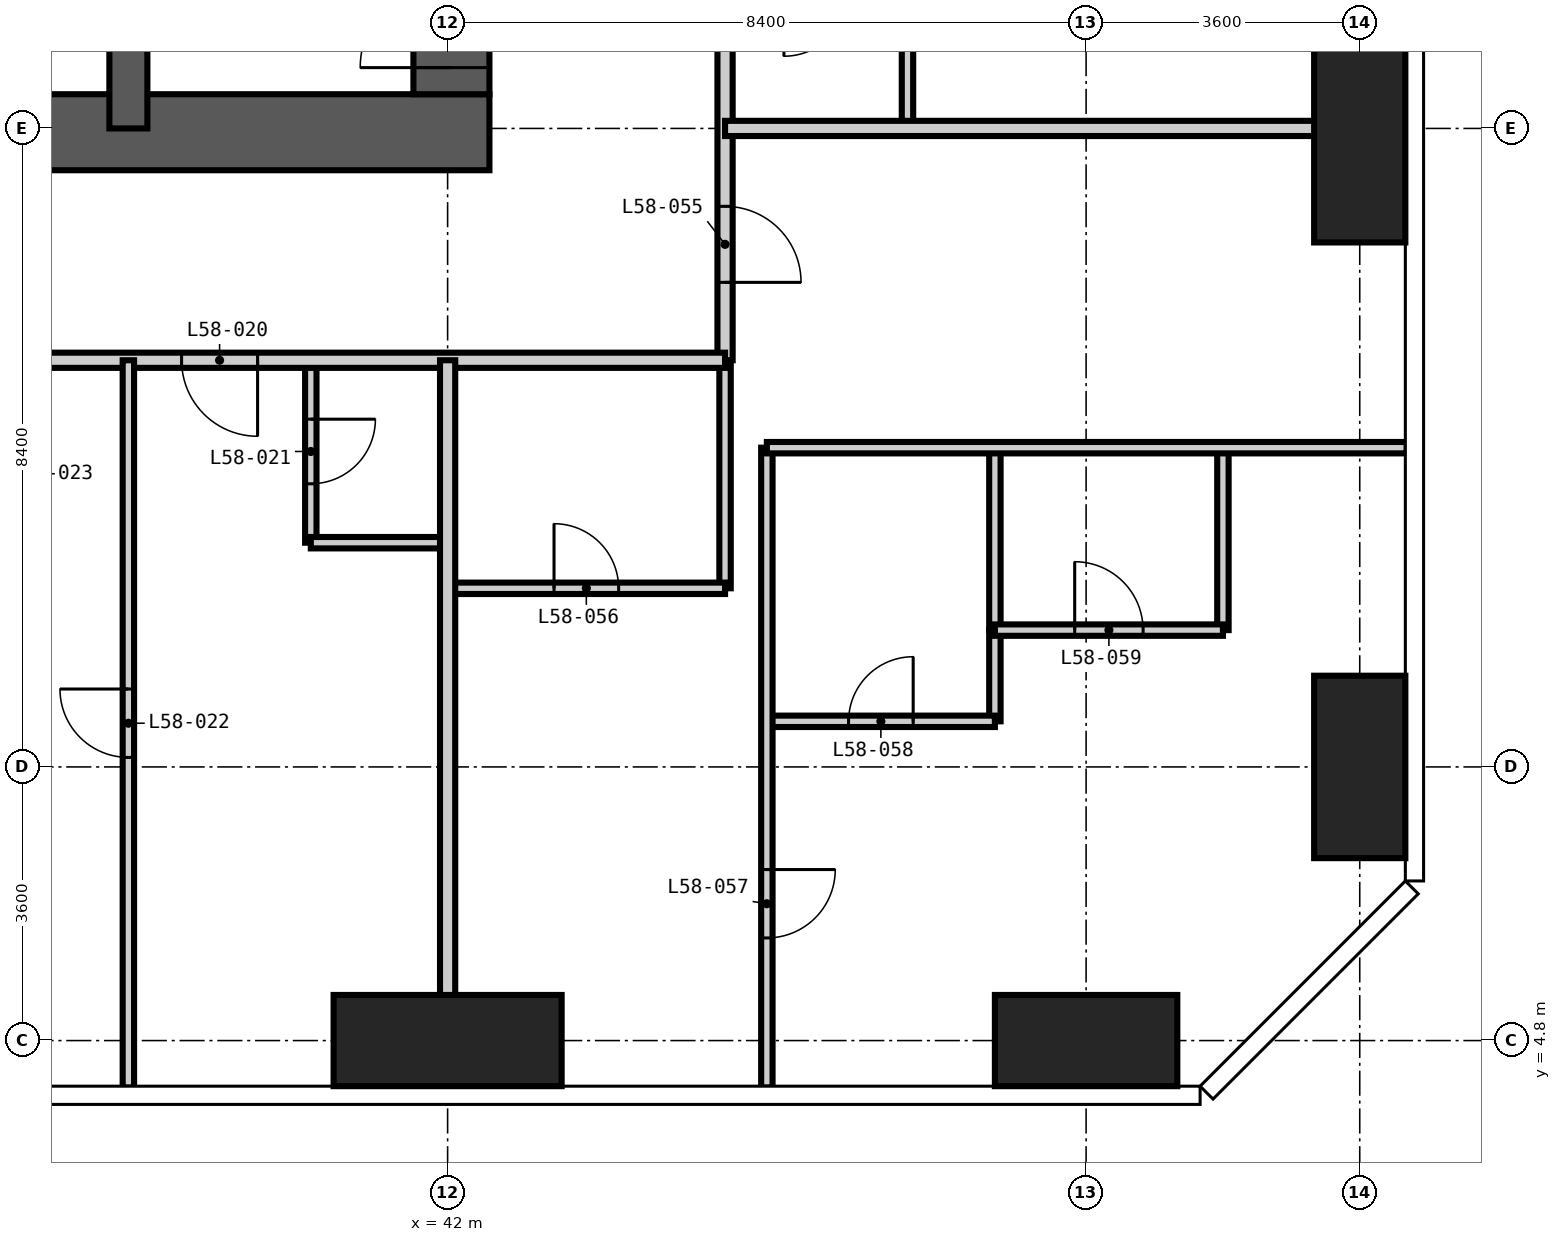
"""IFC4 building model, lengths in metres.
Left out: names, types, materials, properties, quantities, classifications, styles, units other than length and angle.
Written with IfcOpenShell. Run it as: python <this file> out.ifc"""

import sys

from ifc_helpers import new_model, si_unit, direction, frame, frame_2d, origin, origin_2d, place, context, subcontext, project, spatial, rectangle, extrude, element, fill, save


model = new_model("IFC4")
c1 = context("Model", 3, precision=1e-05, world=origin(), true_north=direction((0.0, 1.0)))
c2 = subcontext(c1, "Body", "Model", "MODEL_VIEW")
j1 = project(units=[si_unit("LENGTHUNIT", "METRE"), si_unit("PLANEANGLEUNIT", "RADIAN")], contexts=[c1])
p1 = place(None, origin())
s1 = spatial("IfcSite", under=j1, at=p1, CompositionType="ELEMENT")
p2 = place(p1, origin())
s2 = spatial("IfcBuilding", under=s1, at=p2, CompositionType="ELEMENT")
p3 = place(p2, frame((0.0, 0.0, 225.6)))
s3 = spatial("IfcBuildingStorey", under=s2, at=p3, CompositionType="ELEMENT", Elevation=225.6)
p4 = place(p3, frame((42.0, 4.8, -0.35), z_axis=(0.0, 0.0, 1.0), x_axis=(1.0, 0.0, 0.0)))
e1 = element("IfcColumn", 1, at=p4, inside=s3, PredefinedType="COLUMN", context=c2, shape_type="SweptSolid", body=[
    extrude(rectangle(XDim=3.0, YDim=1.2, at=origin_2d()), origin(), (0.0, 0.0, 1.0), 3.9),
])
p5 = place(p3, frame((50.4, 4.8, -0.35), z_axis=(0.0, 0.0, 1.0), x_axis=(1.0, 0.0, 0.0)))
e2 = element("IfcColumn", 2, at=p5, inside=s3, PredefinedType="COLUMN", context=c2, shape_type="SweptSolid", body=[
    extrude(rectangle(XDim=2.4, YDim=1.2, at=origin_2d()), origin(), (0.0, 0.0, 1.0), 3.9),
])
p6 = place(p3, frame((54.0, 8.4, -0.35), z_axis=(0.0, 0.0, 1.0), x_axis=(1.0, 0.0, 0.0)))
e3 = element("IfcColumn", 3, at=p6, inside=s3, PredefinedType="COLUMN", context=c2, shape_type="SweptSolid", body=[
    extrude(rectangle(XDim=1.2, YDim=2.4, at=origin_2d()), origin(), (0.0, 0.0, 1.0), 3.9),
])
p7 = place(p3, frame((54.0, 16.8, -0.35), z_axis=(0.0, 0.0, 1.0), x_axis=(1.0, 0.0, 0.0)))
e4 = element("IfcColumn", 4, at=p7, inside=s3, PredefinedType="COLUMN", context=c2, shape_type="SweptSolid", body=[
    extrude(rectangle(XDim=1.2, YDim=3.0, at=origin_2d()), origin(), (0.0, 0.0, 1.0), 3.9),
])
p8 = place(p3, frame((24.425, 16.75, -0.35), z_axis=(0.0, 0.0, 1.0), x_axis=(1.0, 0.0, 0.0)))
e5 = element("IfcWall", 5, at=p8, inside=s3, PredefinedType="SHEAR", context=c2, shape_type="SweptSolid", body=[
    extrude(rectangle(XDim=18.125, YDim=1.0, at=frame_2d((9.062, 0.0))), origin(), (0.0, 0.0, 1.0), 3.9),
])
p9 = place(p8, frame((4.475, 0.0, 0.35)))
e6 = element("IfcOpeningElement", 6, at=p9, cuts=e5, PredefinedType="OPENING", context=c2, shape_type="SweptSolid", body=[
    extrude(rectangle(XDim=1.0, YDim=2.1, at=frame_2d((0.5, 1.05))), frame((0.0, 0.51, 0.0), z_axis=(0.0, -1.0, 0.0), x_axis=(1.0, 0.0, 0.0)), (0.0, 0.0, 1.0), 1.02),
])
p10 = place(p8, frame((10.775, 0.0, 0.35)))
e7 = element("IfcOpeningElement", 7, at=p10, cuts=e5, PredefinedType="OPENING", context=c2, shape_type="SweptSolid", body=[
    extrude(rectangle(XDim=1.0, YDim=2.1, at=frame_2d((0.5, 1.05))), frame((0.0, 0.51, 0.0), z_axis=(0.0, -1.0, 0.0), x_axis=(1.0, 0.0, 0.0)), (0.0, 0.0, 1.0), 1.02),
])
p11 = place(p3, frame((42.05, 17.25, -0.35), z_axis=(0.0, 0.0, 1.0), x_axis=(0.0, 1.0, 0.0)))
e8 = element("IfcWall", 8, at=p11, inside=s3, PredefinedType="SHEAR", context=c2, shape_type="SweptSolid", body=[
    extrude(rectangle(XDim=24.3, YDim=1.0, at=frame_2d((12.15, 0.0))), origin(), (0.0, 0.0, 1.0), 3.9),
])
p12 = place(p11, frame((0.35, 0.0, 0.35)))
e9 = element("IfcOpeningElement", 9, at=p12, cuts=e8, PredefinedType="OPENING", context=c2, shape_type="SweptSolid", body=[
    extrude(rectangle(XDim=1.2, YDim=2.2, at=frame_2d((0.6, 1.1))), frame((0.0, 0.51, 0.0), z_axis=(0.0, -1.0, 0.0), x_axis=(1.0, 0.0, 0.0)), (0.0, 0.0, 1.0), 1.02),
])
p13 = place(p11, frame((11.25, 0.0, 0.35)))
e10 = element("IfcOpeningElement", 10, at=p13, cuts=e8, PredefinedType="OPENING", context=c2, shape_type="SweptSolid", body=[
    extrude(rectangle(XDim=1.8, YDim=2.2, at=frame_2d((0.9, 1.1))), frame((0.0, 0.51, 0.0), z_axis=(0.0, -1.0, 0.0), x_axis=(1.0, 0.0, 0.0)), (0.0, 0.0, 1.0), 1.02),
])
p14 = place(p11, frame((20.05, 0.0, 0.35)))
e11 = element("IfcOpeningElement", 11, at=p14, cuts=e8, PredefinedType="OPENING", context=c2, shape_type="SweptSolid", body=[
    extrude(rectangle(XDim=1.0, YDim=2.1, at=frame_2d((0.5, 1.05))), frame((0.0, 0.51, 0.0), z_axis=(0.0, -1.0, 0.0), x_axis=(1.0, 0.0, 0.0)), (0.0, 0.0, 1.0), 1.02),
])
p15 = place(p3, frame((37.8, 16.8, -0.35), z_axis=(0.0, 0.0, 1.0), x_axis=(0.0, 1.0, 0.0)))
e12 = element("IfcWall", 12, at=p15, inside=s3, PredefinedType="SHEAR", context=c2, shape_type="SweptSolid", body=[
    extrude(rectangle(XDim=11.2, YDim=0.5, at=frame_2d((5.6, 0.0))), origin(), (0.0, 0.0, 1.0), 3.9),
])
p16 = place(p3, frame((40.2, 11.35, 0.0), z_axis=(0.0, 0.0, 1.0), x_axis=(0.0, 1.0, 0.0)))
e13 = element("IfcWall", 13, at=p16, inside=s3, PredefinedType="PARTITIONING", context=c2, shape_type="SweptSolid", body=[
    extrude(rectangle(XDim=2.4, YDim=0.15, at=frame_2d((1.2, 0.0))), origin(), (0.0, 0.0, 1.0), 3.55),
])
p17 = place(p16, frame((0.775, 0.0, 0.0)))
e14 = element("IfcOpeningElement", 14, at=p17, cuts=e13, PredefinedType="OPENING", context=c2, shape_type="SweptSolid", body=[
    extrude(rectangle(XDim=0.85, YDim=2.1, at=frame_2d((0.425, 1.05))), frame((0.0, 0.085, 0.0), z_axis=(0.0, -1.0, 0.0), x_axis=(1.0, 0.0, 0.0)), (0.0, 0.0, 1.0), 0.17),
])
p18 = place(p3, frame((45.65, 10.75, 0.0), z_axis=(0.0, 0.0, 1.0), x_axis=(0.0, 1.0, 0.0)))
e15 = element("IfcWall", 15, at=p18, inside=s3, PredefinedType="PARTITIONING", context=c2, shape_type="SweptSolid", body=[
    extrude(rectangle(XDim=3.0, YDim=0.15, at=frame_2d((1.5, 0.0))), origin(), (0.0, 0.0, 1.0), 3.55),
])
p19 = place(p3, frame((48.05, 16.8, 0.0), z_axis=(0.0, 0.0, 1.0), x_axis=(0.0, 1.0, 0.0)))
e16 = element("IfcWall", 16, at=p19, inside=s3, PredefinedType="PARTITIONING", context=c2, shape_type="SweptSolid", body=[
    extrude(rectangle(XDim=1.8, YDim=0.15, at=frame_2d((0.9, 0.0))), origin(), (0.0, 0.0, 1.0), 3.55),
])
p20 = place(p3, frame((49.2, 9.0, 0.0), z_axis=(0.0, 0.0, 1.0), x_axis=(0.0, 1.0, 0.0)))
e17 = element("IfcWall", 17, at=p20, inside=s3, PredefinedType="PARTITIONING", context=c2, shape_type="SweptSolid", body=[
    extrude(rectangle(XDim=1.2, YDim=0.15, at=frame_2d((0.6, 0.0))), origin(), (0.0, 0.0, 1.0), 3.55),
])
p21 = place(p3, frame((46.2, 9.0, 0.0), z_axis=(0.0, 0.0, 1.0), x_axis=(1.0, 0.0, 0.0)))
e18 = element("IfcWall", 18, at=p21, inside=s3, PredefinedType="PARTITIONING", context=c2, shape_type="SweptSolid", body=[
    extrude(rectangle(XDim=3.0, YDim=0.15, at=frame_2d((1.5, 0.0))), origin(), (0.0, 0.0, 1.0), 3.55),
])
p22 = place(p21, frame((1.075, 0.0, 0.0)))
e19 = element("IfcOpeningElement", 19, at=p22, cuts=e18, PredefinedType="OPENING", context=c2, shape_type="SweptSolid", body=[
    extrude(rectangle(XDim=0.85, YDim=2.1, at=frame_2d((0.425, 1.05))), frame((0.0, 0.085, 0.0), z_axis=(0.0, -1.0, 0.0), x_axis=(1.0, 0.0, 0.0)), (0.0, 0.0, 1.0), 0.17),
])
p23 = place(p3, frame((42.0, 10.75, 0.0), z_axis=(0.0, 0.0, 1.0), x_axis=(1.0, 0.0, 0.0)))
e20 = element("IfcWall", 20, at=p23, inside=s3, PredefinedType="PARTITIONING", context=c2, shape_type="SweptSolid", body=[
    extrude(rectangle(XDim=3.65, YDim=0.15, at=frame_2d((1.825, 0.0))), origin(), (0.0, 0.0, 1.0), 3.55),
])
p24 = place(p23, frame((1.4, 0.0, 0.0)))
e21 = element("IfcOpeningElement", 21, at=p24, cuts=e20, PredefinedType="OPENING", context=c2, shape_type="SweptSolid", body=[
    extrude(rectangle(XDim=0.85, YDim=2.1, at=frame_2d((0.425, 1.05))), frame((0.0, 0.085, 0.0), z_axis=(0.0, -1.0, 0.0), x_axis=(1.0, 0.0, 0.0)), (0.0, 0.0, 1.0), 0.17),
])
p25 = place(p3, frame((40.2, 11.35, 0.0), z_axis=(0.0, 0.0, 1.0), x_axis=(1.0, 0.0, 0.0)))
e22 = element("IfcWall", 22, at=p25, inside=s3, PredefinedType="PARTITIONING", context=c2, shape_type="SweptSolid", body=[
    extrude(rectangle(XDim=1.8, YDim=0.15, at=frame_2d((0.9, 0.0))), origin(), (0.0, 0.0, 1.0), 3.55),
])
p26 = place(p3, frame((45.65, 25.2, 0.0), z_axis=(0.0, 0.0, 1.0), x_axis=(0.0, -1.0, 0.0)))
e23 = element("IfcWall", 23, at=p26, inside=s3, PredefinedType="PARTITIONING", context=c2, shape_type="SweptSolid", body=[
    extrude(rectangle(XDim=11.45, YDim=0.2, at=frame_2d((5.725, 0.0))), origin(), (0.0, 0.0, 1.0), 3.55),
])
p27 = place(p26, frame((4.9, 0.0, 0.0)))
e24 = element("IfcOpeningElement", 24, at=p27, cuts=e23, PredefinedType="OPENING", context=c2, shape_type="SweptSolid", body=[
    extrude(rectangle(XDim=1.0, YDim=2.2, at=frame_2d((0.5, 1.1))), frame((0.0, 0.11, 0.0), z_axis=(0.0, -1.0, 0.0), x_axis=(1.0, 0.0, 0.0)), (0.0, 0.0, 1.0), 0.22),
])
p28 = place(p26, frame((9.425, 0.0, 0.0)))
e25 = element("IfcOpeningElement", 25, at=p28, cuts=e23, PredefinedType="OPENING", context=c2, shape_type="SweptSolid", body=[
    extrude(rectangle(XDim=1.0, YDim=2.2, at=frame_2d((0.5, 1.1))), frame((0.0, 0.11, 0.0), z_axis=(0.0, -1.0, 0.0), x_axis=(1.0, 0.0, 0.0)), (0.0, 0.0, 1.0), 0.22),
])
p29 = place(p3, frame((45.65, 13.75, 0.0), z_axis=(0.0, 0.0, 1.0), x_axis=(-1.0, 0.0, 0.0)))
e26 = element("IfcWall", 26, at=p29, inside=s3, PredefinedType="PARTITIONING", context=c2, shape_type="SweptSolid", body=[
    extrude(rectangle(XDim=23.725, YDim=0.2, at=frame_2d((11.862, 0.0))), origin(), (0.0, 0.0, 1.0), 3.55),
])
p30 = place(p29, frame((16.95, 0.0, 0.0)))
e27 = element("IfcOpeningElement", 27, at=p30, cuts=e26, PredefinedType="OPENING", context=c2, shape_type="SweptSolid", body=[
    extrude(rectangle(XDim=1.0, YDim=2.2, at=frame_2d((0.5, 1.1))), frame((0.0, 0.11, 0.0), z_axis=(0.0, -1.0, 0.0), x_axis=(1.0, 0.0, 0.0)), (0.0, 0.0, 1.0), 0.22),
])
p31 = place(p29, frame((6.15, 0.0, 0.0)))
e28 = element("IfcOpeningElement", 28, at=p31, cuts=e26, PredefinedType="OPENING", context=c2, shape_type="SweptSolid", body=[
    extrude(rectangle(XDim=1.0, YDim=2.2, at=frame_2d((0.5, 1.1))), frame((0.0, 0.11, 0.0), z_axis=(0.0, -1.0, 0.0), x_axis=(1.0, 0.0, 0.0)), (0.0, 0.0, 1.0), 0.22),
])
p32 = place(p3, frame((42.0, 4.182, 0.0), z_axis=(0.0, 0.0, 1.0), x_axis=(0.0, 1.0, 0.0)))
e29 = element("IfcWall", 29, at=p32, inside=s3, PredefinedType="PARTITIONING", context=c2, shape_type="SweptSolid", body=[
    extrude(rectangle(XDim=9.568, YDim=0.2, at=frame_2d((4.784, 0.0))), origin(), (0.0, 0.0, 1.0), 3.55),
])
p33 = place(p3, frame((45.65, 16.8, 0.0), z_axis=(0.0, 0.0, 1.0), x_axis=(1.0, 0.0, 0.0)))
e30 = element("IfcWall", 30, at=p33, inside=s3, PredefinedType="PARTITIONING", context=c2, shape_type="SweptSolid", body=[
    extrude(rectangle(XDim=8.968, YDim=0.2, at=frame_2d((4.484, 0.0))), origin(), (0.0, 0.0, 1.0), 3.55),
])
p34 = place(p3, frame((37.8, 4.182, 0.0), z_axis=(0.0, 0.0, 1.0), x_axis=(0.0, 1.0, 0.0)))
e31 = element("IfcWall", 31, at=p34, inside=s3, PredefinedType="PARTITIONING", context=c2, shape_type="SweptSolid", body=[
    extrude(rectangle(XDim=9.568, YDim=0.15, at=frame_2d((4.784, 0.0))), origin(), (0.0, 0.0, 1.0), 3.55),
])
p35 = place(p34, frame((4.343, 0.0, 0.0)))
e32 = element("IfcOpeningElement", 32, at=p35, cuts=e31, PredefinedType="OPENING", context=c2, shape_type="SweptSolid", body=[
    extrude(rectangle(XDim=0.9, YDim=2.1, at=frame_2d((0.45, 1.05))), frame((0.0, 0.085, 0.0), z_axis=(0.0, -1.0, 0.0), x_axis=(1.0, 0.0, 0.0)), (0.0, 0.0, 1.0), 0.17),
])
p36 = place(p3, frame((46.2, 4.182, 0.0), z_axis=(0.0, 0.0, 1.0), x_axis=(0.0, 1.0, 0.0)))
e33 = element("IfcWall", 33, at=p36, inside=s3, PredefinedType="PARTITIONING", context=c2, shape_type="SweptSolid", body=[
    extrude(rectangle(XDim=8.418, YDim=0.15, at=frame_2d((4.209, 0.0))), origin(), (0.0, 0.0, 1.0), 3.55),
])
p37 = place(p36, frame((1.968, 0.0, 0.0)))
e34 = element("IfcOpeningElement", 34, at=p37, cuts=e33, PredefinedType="OPENING", context=c2, shape_type="SweptSolid", body=[
    extrude(rectangle(XDim=0.9, YDim=2.1, at=frame_2d((0.45, 1.05))), frame((0.0, 0.085, 0.0), z_axis=(0.0, -1.0, 0.0), x_axis=(1.0, 0.0, 0.0)), (0.0, 0.0, 1.0), 0.17),
])
for number, where, z_axis, x_axis in (
    (35, (49.2, 10.2, 0.0), (0.0, 0.0, 1.0), (0.0, 1.0, 0.0)),
    (36, (52.2, 10.2, 0.0), (0.0, 0.0, 1.0), (0.0, 1.0, 0.0)),
):
    element("IfcWall", number, at=place(p3, frame(where, z_axis=z_axis, x_axis=x_axis)), inside=s3, PredefinedType="PARTITIONING", context=c2, shape_type="SweptSolid", body=[
        extrude(rectangle(XDim=2.4, YDim=0.15, at=frame_2d((1.2, 0.0))), origin(), (0.0, 0.0, 1.0), 3.55),
    ])
p38 = place(p3, frame((49.2, 10.2, 0.0), z_axis=(0.0, 0.0, 1.0), x_axis=(1.0, 0.0, 0.0)))
e37 = element("IfcWall", 37, at=p38, inside=s3, PredefinedType="PARTITIONING", context=c2, shape_type="SweptSolid", body=[
    extrude(rectangle(XDim=3.0, YDim=0.15, at=frame_2d((1.5, 0.0))), origin(), (0.0, 0.0, 1.0), 3.55),
])
p39 = place(p38, frame((1.05, 0.0, 0.0)))
e38 = element("IfcOpeningElement", 38, at=p39, cuts=e37, PredefinedType="OPENING", context=c2, shape_type="SweptSolid", body=[
    extrude(rectangle(XDim=0.9, YDim=2.1, at=frame_2d((0.45, 1.05))), frame((0.0, 0.085, 0.0), z_axis=(0.0, -1.0, 0.0), x_axis=(1.0, 0.0, 0.0)), (0.0, 0.0, 1.0), 0.17),
])
p40 = place(p3, frame((46.2, 12.6, 0.0), z_axis=(0.0, 0.0, 1.0), x_axis=(1.0, 0.0, 0.0)))
e39 = element("IfcWall", 39, at=p40, inside=s3, PredefinedType="PARTITIONING", context=c2, shape_type="SweptSolid", body=[
    extrude(rectangle(XDim=8.418, YDim=0.15, at=frame_2d((4.209, 0.0))), origin(), (0.0, 0.0, 1.0), 3.55),
])
p41 = place(p12, origin())
e40 = element("IfcDoor", 40, at=p41, inside=s3, OperationType="SINGLE_SWING_LEFT", PredefinedType="DOOR", context=c2, shape_type="SweptSolid", body=[
    extrude(rectangle(XDim=1.2, YDim=2.2, at=frame_2d((0.6, 1.1))), frame((0.0, 0.025, 0.0), z_axis=(0.0, -1.0, 0.0), x_axis=(1.0, 0.0, 0.0)), (0.0, 0.0, 1.0), 0.05),
])
fill(e9, e40)
p42 = place(p31, origin())
e41 = element("IfcDoor", 41, at=p42, inside=s3, OperationType="SINGLE_SWING_LEFT", PredefinedType="DOOR", context=c2, shape_type="SweptSolid", body=[
    extrude(rectangle(XDim=1.0, YDim=2.2, at=frame_2d((0.5, 1.1))), frame((0.0, 0.025, 0.0), z_axis=(0.0, -1.0, 0.0), x_axis=(1.0, 0.0, 0.0)), (0.0, 0.0, 1.0), 0.05),
])
fill(e28, e41)
p43 = place(p17, frame((0.85, 0.0, 0.0), z_axis=(0.0, 0.0, 1.0), x_axis=(-1.0, 0.0, 0.0)))
e42 = element("IfcDoor", 42, at=p43, inside=s3, OperationType="SINGLE_SWING_LEFT", PredefinedType="DOOR", context=c2, shape_type="SweptSolid", body=[
    extrude(rectangle(XDim=0.85, YDim=2.1, at=frame_2d((0.425, 1.05))), frame((0.0, 0.025, 0.0), z_axis=(0.0, -1.0, 0.0), x_axis=(1.0, 0.0, 0.0)), (0.0, 0.0, 1.0), 0.05),
])
fill(e14, e42)
p44 = place(p35, origin())
e43 = element("IfcDoor", 43, at=p44, inside=s3, OperationType="SINGLE_SWING_RIGHT", PredefinedType="DOOR", context=c2, shape_type="SweptSolid", body=[
    extrude(rectangle(XDim=0.9, YDim=2.1, at=frame_2d((0.45, 1.05))), frame((0.0, 0.025, 0.0), z_axis=(0.0, -1.0, 0.0), x_axis=(1.0, 0.0, 0.0)), (0.0, 0.0, 1.0), 0.05),
])
fill(e32, e43)
p45 = place(p28, origin())
e44 = element("IfcDoor", 44, at=p45, inside=s3, OperationType="SINGLE_SWING_RIGHT", PredefinedType="DOOR", context=c2, shape_type="SweptSolid", body=[
    extrude(rectangle(XDim=1.0, YDim=2.2, at=frame_2d((0.5, 1.1))), frame((0.0, 0.025, 0.0), z_axis=(0.0, -1.0, 0.0), x_axis=(1.0, 0.0, 0.0)), (0.0, 0.0, 1.0), 0.05),
])
fill(e25, e44)
p46 = place(p24, origin())
e45 = element("IfcDoor", 45, at=p46, inside=s3, OperationType="SINGLE_SWING_LEFT", PredefinedType="DOOR", context=c2, shape_type="SweptSolid", body=[
    extrude(rectangle(XDim=0.85, YDim=2.1, at=frame_2d((0.425, 1.05))), frame((0.0, 0.025, 0.0), z_axis=(0.0, -1.0, 0.0), x_axis=(1.0, 0.0, 0.0)), (0.0, 0.0, 1.0), 0.05),
])
fill(e21, e45)
p47 = place(p37, frame((0.9, 0.0, 0.0), z_axis=(0.0, 0.0, 1.0), x_axis=(-1.0, 0.0, 0.0)))
e46 = element("IfcDoor", 46, at=p47, inside=s3, OperationType="SINGLE_SWING_LEFT", PredefinedType="DOOR", context=c2, shape_type="SweptSolid", body=[
    extrude(rectangle(XDim=0.9, YDim=2.1, at=frame_2d((0.45, 1.05))), frame((0.0, 0.025, 0.0), z_axis=(0.0, -1.0, 0.0), x_axis=(1.0, 0.0, 0.0)), (0.0, 0.0, 1.0), 0.05),
])
fill(e34, e46)
p48 = place(p22, origin())
e47 = element("IfcDoor", 47, at=p48, inside=s3, OperationType="SINGLE_SWING_RIGHT", PredefinedType="DOOR", context=c2, shape_type="SweptSolid", body=[
    extrude(rectangle(XDim=0.85, YDim=2.1, at=frame_2d((0.425, 1.05))), frame((0.0, 0.025, 0.0), z_axis=(0.0, -1.0, 0.0), x_axis=(1.0, 0.0, 0.0)), (0.0, 0.0, 1.0), 0.05),
])
fill(e19, e47)
p49 = place(p39, origin())
e48 = element("IfcDoor", 48, at=p49, inside=s3, OperationType="SINGLE_SWING_LEFT", PredefinedType="DOOR", context=c2, shape_type="SweptSolid", body=[
    extrude(rectangle(XDim=0.9, YDim=2.1, at=frame_2d((0.45, 1.05))), frame((0.0, 0.025, 0.0), z_axis=(0.0, -1.0, 0.0), x_axis=(1.0, 0.0, 0.0)), (0.0, 0.0, 1.0), 0.05),
])
fill(e38, e48)
save(model, sys.argv[1])
